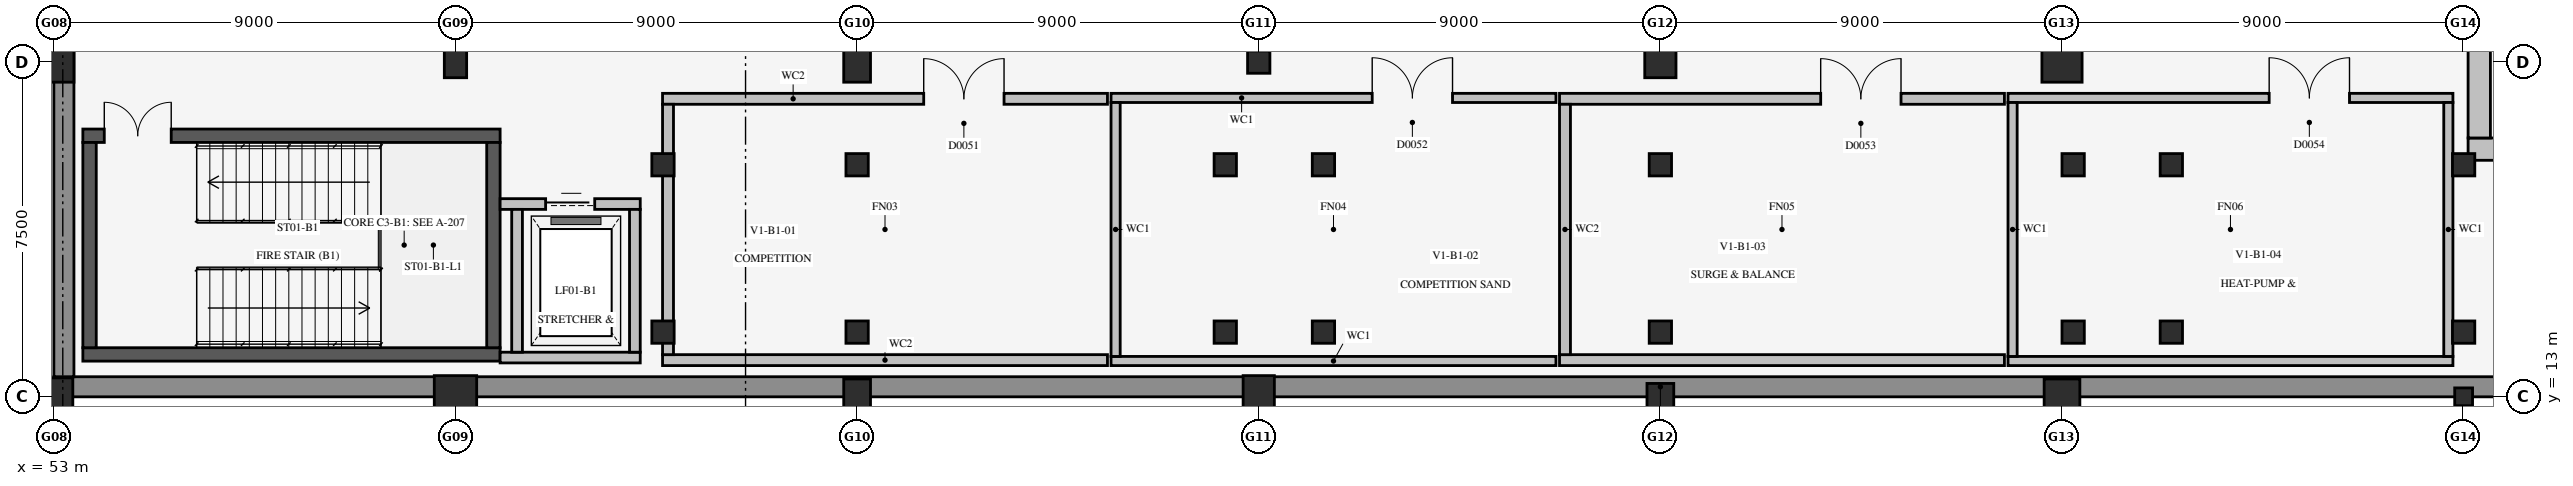
"""IFC4 building model, lengths in metres.
Left out: names, types, materials, properties, quantities, classifications, styles, units other than length and angle.
Written with IfcOpenShell. Run it as: python <this file> out.ifc"""

import sys

from ifc_helpers import new_model, si_unit, direction, frame, frame_2d, origin, origin_2d, place, context, subcontext, project, spatial, rectangle, circle, extrude, element, fill, save


model = new_model("IFC4")
c1 = context("Model", 3, precision=1e-05, world=origin(), true_north=direction((0.0, 1.0)))
c2 = subcontext(c1, "Body", "Model", "MODEL_VIEW")
j1 = project(units=[si_unit("LENGTHUNIT", "METRE"), si_unit("PLANEANGLEUNIT", "RADIAN")], contexts=[c1])
p1 = place(None, origin())
s1 = spatial("IfcSite", under=j1, at=p1, CompositionType="ELEMENT")
p2 = place(p1, origin())
s2 = spatial("IfcBuilding", under=s1, at=p2, CompositionType="ELEMENT")
p3 = place(p2, frame((0.0, 0.0, -5.2)))
s3 = spatial("IfcBuildingStorey", under=s2, at=p3, CompositionType="ELEMENT", Elevation=-5.2)
p4 = place(p3, frame((107.1, 18.55, 0.0), z_axis=(0.0, 0.0, 1.0), x_axis=(1.0, 0.0, 0.0)))
e1 = element("IfcWall", 1, at=p4, inside=s3, PredefinedType="USERDEFINED", context=c2, shape_type="SweptSolid", body=[
    extrude(rectangle(XDim=17.45, YDim=0.5, at=frame_2d((8.725, 0.0))), origin(), (0.0, 0.0, 1.0), 4.92),
])
p5 = place(p3, frame((107.35, 18.8, 0.0), z_axis=(0.0, 0.0, 1.0), x_axis=(0.0, 1.0, 0.0)))
e2 = element("IfcWall", 2, at=p5, inside=s3, PredefinedType="USERDEFINED", context=c2, shape_type="SweptSolid", body=[
    extrude(rectangle(XDim=19.8, YDim=0.5, at=frame_2d((9.9, 0.0))), origin(), (0.0, 0.0, 1.0), 4.92),
])
p6 = place(p3, frame((53.0, 13.225, 0.0), z_axis=(0.0, 0.0, 1.0), x_axis=(1.0, 0.0, 0.0)))
e3 = element("IfcWall", 3, at=p6, inside=s3, PredefinedType="USERDEFINED", context=c2, shape_type="SweptSolid", body=[
    extrude(rectangle(XDim=72.0, YDim=0.45, at=frame_2d((36.0, 0.0))), origin(), (0.0, 0.0, 1.0), 4.92),
])
p7 = place(p3, frame((53.225, 13.45, 0.0), z_axis=(0.0, 0.0, 1.0), x_axis=(0.0, 1.0, 0.0)))
e4 = element("IfcWall", 4, at=p7, inside=s3, PredefinedType="USERDEFINED", context=c2, shape_type="SweptSolid", body=[
    extrude(rectangle(XDim=45.1, YDim=0.45, at=frame_2d((22.55, 0.0))), origin(), (0.0, 0.0, 1.0), 4.92),
])
p8 = place(p3, frame((53.65, 13.95, 0.0), z_axis=(0.0, 0.0, 1.0), x_axis=(1.0, 0.0, 0.0)))
e5 = element("IfcWall", 5, at=p8, inside=s3, PredefinedType="SHEAR", context=c2, shape_type="SweptSolid", body=[
    extrude(rectangle(XDim=9.35, YDim=0.3, at=frame_2d((4.675, 0.0))), origin(), (0.0, 0.0, 1.0), 4.92),
])
p9 = place(p3, frame((53.65, 18.85, 0.0), z_axis=(0.0, 0.0, 1.0), x_axis=(1.0, 0.0, 0.0)))
e6 = element("IfcWall", 6, at=p9, inside=s3, PredefinedType="SHEAR", context=c2, shape_type="SweptSolid", body=[
    extrude(rectangle(XDim=9.35, YDim=0.3, at=frame_2d((4.675, 0.0))), origin(), (0.0, 0.0, 1.0), 4.92),
])
p10 = place(p9, frame((0.48, 0.0, 0.0)))
e7 = element("IfcOpeningElement", 7, at=p10, cuts=e6, PredefinedType="OPENING", context=c2, shape_type="SweptSolid", body=[
    extrude(rectangle(XDim=1.5, YDim=2.3, at=frame_2d((0.75, 1.15))), frame((0.0, 0.162, 0.0), z_axis=(0.0, -1.0, 0.0), x_axis=(1.0, 0.0, 0.0)), (0.0, 0.0, 1.0), 0.324),
])
for number, where, z_axis, x_axis in (
    (8, (53.8, 14.1, 0.0), (0.0, 0.0, 1.0), (0.0, 1.0, 0.0)),
    (9, (62.85, 14.1, 0.0), (0.0, 0.0, 1.0), (0.0, 1.0, 0.0)),
):
    element("IfcWall", number, at=place(p3, frame(where, z_axis=z_axis, x_axis=x_axis)), inside=s3, PredefinedType="SHEAR", context=c2, shape_type="SweptSolid", body=[
        extrude(rectangle(XDim=4.6, YDim=0.3, at=frame_2d((2.3, 0.0))), origin(), (0.0, 0.0, 1.0), 4.92),
    ])
p11 = place(p3, frame((63.0, 13.88, 0.0), z_axis=(0.0, 0.0, 1.0), x_axis=(1.0, 0.0, 0.0)))
e10 = element("IfcWall", 10, at=p11, inside=s3, PredefinedType="SOLIDWALL", context=c2, shape_type="SweptSolid", body=[
    extrude(rectangle(XDim=3.14, YDim=0.24, at=frame_2d((1.57, 0.0))), origin(), (0.0, 0.0, 1.0), 5.2),
])
p12 = place(p3, frame((63.0, 17.32, 0.0), z_axis=(0.0, 0.0, 1.0), x_axis=(1.0, 0.0, 0.0)))
e11 = element("IfcWall", 11, at=p12, inside=s3, PredefinedType="SOLIDWALL", context=c2, shape_type="SweptSolid", body=[
    extrude(rectangle(XDim=3.14, YDim=0.24, at=frame_2d((1.57, 0.0))), origin(), (0.0, 0.0, 1.0), 5.2),
])
p13 = place(p12, frame((1.02, 0.0, 0.0)))
e12 = element("IfcOpeningElement", 12, at=p13, cuts=e11, PredefinedType="OPENING", context=c2, shape_type="SweptSolid", body=[
    extrude(rectangle(XDim=1.1, YDim=2.15, at=frame_2d((0.55, 1.075))), frame((0.0, 0.132, 0.0), z_axis=(0.0, -1.0, 0.0), x_axis=(1.0, 0.0, 0.0)), (0.0, 0.0, 1.0), 0.264),
])
for number, where, z_axis, x_axis in (
    (13, (63.38, 14.0, 0.0), (0.0, 0.0, 1.0), (0.0, 1.0, 0.0)),
    (14, (66.02, 14.0, 0.0), (0.0, 0.0, 1.0), (0.0, 1.0, 0.0)),
):
    element("IfcWall", number, at=place(p3, frame(where, z_axis=z_axis, x_axis=x_axis)), inside=s3, PredefinedType="SOLIDWALL", context=c2, shape_type="SweptSolid", body=[
        extrude(rectangle(XDim=3.2, YDim=0.24, at=frame_2d((1.6, 0.0))), origin(), (0.0, 0.0, 1.0), 5.2),
    ])
p14 = place(p3, frame((53.0, 13.0, 0.0), z_axis=(0.0, 0.0, 1.0), x_axis=(1.0, 0.0, 0.0)))
e15 = element("IfcColumn", 15, at=p14, inside=s3, PredefinedType="COLUMN", context=c2, shape_type="SweptSolid", body=[
    extrude(rectangle(XDim=0.85, YDim=0.85, at=origin_2d()), origin(), (0.0, 0.0, 1.0), 5.2),
])
p15 = place(p3, frame((53.0, 20.5, 0.0), z_axis=(0.0, 0.0, 1.0), x_axis=(1.0, 0.0, 0.0)))
e16 = element("IfcColumn", 16, at=p15, inside=s3, PredefinedType="COLUMN", context=c2, shape_type="SweptSolid", body=[
    extrude(rectangle(XDim=0.9, YDim=0.9, at=origin_2d()), origin(), (0.0, 0.0, 1.0), 5.2),
])
p16 = place(p3, frame((62.0, 13.0, 0.0), z_axis=(0.0, 0.0, 1.0), x_axis=(1.0, 0.0, 0.0)))
e17 = element("IfcColumn", 17, at=p16, inside=s3, PredefinedType="COLUMN", context=c2, shape_type="SweptSolid", body=[
    extrude(rectangle(XDim=0.95, YDim=0.95, at=origin_2d()), origin(), (0.0, 0.0, 1.0), 5.2),
])
p17 = place(p3, frame((62.0, 20.5, 0.0), z_axis=(0.0, 0.0, 1.0), x_axis=(1.0, 0.0, 0.0)))
e18 = element("IfcColumn", 18, at=p17, inside=s3, PredefinedType="COLUMN", context=c2, shape_type="SweptSolid", body=[
    extrude(rectangle(XDim=0.5, YDim=0.7, at=origin_2d()), origin(), (0.0, 0.0, 1.0), 4.9),
])
p18 = place(p3, frame((71.0, 13.0, 0.0), z_axis=(0.0, 0.0, 1.0), x_axis=(1.0, 0.0, 0.0)))
e19 = element("IfcColumn", 19, at=p18, inside=s3, PredefinedType="COLUMN", context=c2, shape_type="SweptSolid", body=[
    extrude(rectangle(XDim=0.6, YDim=0.8, at=origin_2d()), origin(), (0.0, 0.0, 1.0), 5.2),
])
p19 = place(p3, frame((71.0, 20.5, 0.0), z_axis=(0.0, 0.0, 1.0), x_axis=(1.0, 0.0, 0.0)))
e20 = element("IfcColumn", 20, at=p19, inside=s3, PredefinedType="COLUMN", context=c2, shape_type="SweptSolid", body=[
    extrude(rectangle(XDim=0.6, YDim=0.9, at=origin_2d()), origin(), (0.0, 0.0, 1.0), 4.9),
])
p20 = place(p3, frame((80.0, 13.0, 0.0), z_axis=(0.0, 0.0, 1.0), x_axis=(1.0, 0.0, 0.0)))
e21 = element("IfcColumn", 21, at=p20, inside=s3, PredefinedType="COLUMN", context=c2, shape_type="SweptSolid", body=[
    extrude(rectangle(XDim=0.7, YDim=0.95, at=origin_2d()), origin(), (0.0, 0.0, 1.0), 5.2),
])
p21 = place(p3, frame((80.0, 20.5, 0.0), z_axis=(0.0, 0.0, 1.0), x_axis=(1.0, 0.0, 0.0)))
e22 = element("IfcColumn", 22, at=p21, inside=s3, PredefinedType="COLUMN", context=c2, shape_type="SweptSolid", body=[
    extrude(circle(Radius=0.25, at=origin_2d()), origin(), (0.0, 0.0, 1.0), 4.9),
])
p22 = place(p3, frame((89.0, 13.0, 0.0), z_axis=(0.0, 0.0, 1.0), x_axis=(1.0, 0.0, 0.0)))
e23 = element("IfcColumn", 23, at=p22, inside=s3, PredefinedType="COLUMN", context=c2, shape_type="SweptSolid", body=[
    extrude(circle(Radius=0.3, at=origin_2d()), origin(), (0.0, 0.0, 1.0), 5.2),
])
p23 = place(p3, frame((89.0, 20.5, 0.0), z_axis=(0.0, 0.0, 1.0), x_axis=(1.0, 0.0, 0.0)))
e24 = element("IfcColumn", 24, at=p23, inside=s3, PredefinedType="COLUMN", context=c2, shape_type="SweptSolid", body=[
    extrude(circle(Radius=0.35, at=origin_2d()), origin(), (0.0, 0.0, 1.0), 4.9),
])
p24 = place(p3, frame((98.0, 13.0, 0.0), z_axis=(0.0, 0.0, 1.0), x_axis=(1.0, 0.0, 0.0)))
e25 = element("IfcColumn", 25, at=p24, inside=s3, PredefinedType="COLUMN", context=c2, shape_type="SweptSolid", body=[
    extrude(circle(Radius=0.4, at=origin_2d()), origin(), (0.0, 0.0, 1.0), 5.2),
])
p25 = place(p3, frame((98.0, 20.5, 0.0), z_axis=(0.0, 0.0, 1.0), x_axis=(1.0, 0.0, 0.0)))
e26 = element("IfcColumn", 26, at=p25, inside=s3, PredefinedType="COLUMN", context=c2, shape_type="SweptSolid", body=[
    extrude(circle(Radius=0.45, at=origin_2d()), origin(), (0.0, 0.0, 1.0), 4.9),
])
p26 = place(p3, frame((107.0, 13.0, 0.0), z_axis=(0.0, 0.0, 1.0), x_axis=(1.0, 0.0, 0.0)))
e27 = element("IfcColumn", 27, at=p26, inside=s3, PredefinedType="COLUMN", context=c2, shape_type="SweptSolid", body=[
    extrude(rectangle(XDim=0.4, YDim=0.4, at=origin_2d()), origin(), (0.0, 0.0, 1.0), 5.2),
])
for number, where, z_axis, x_axis in (
    (28, (66.65, 18.2, 0.0), (0.0, 0.0, 1.0), (1.0, 0.0, 0.0)),
    (29, (66.65, 14.45, 0.0), (0.0, 0.0, 1.0), (1.0, 0.0, 0.0)),
    (30, (71.0, 18.2, 0.0), (0.0, 0.0, 1.0), (1.0, 0.0, 0.0)),
    (31, (71.0, 14.45, 0.0), (0.0, 0.0, 1.0), (1.0, 0.0, 0.0)),
    (32, (79.25, 18.2, 0.0), (0.0, 0.0, 1.0), (1.0, 0.0, 0.0)),
    (33, (79.25, 14.45, 0.0), (0.0, 0.0, 1.0), (1.0, 0.0, 0.0)),
    (34, (81.45, 18.2, 0.0), (0.0, 0.0, 1.0), (1.0, 0.0, 0.0)),
    (35, (81.45, 14.45, 0.0), (0.0, 0.0, 1.0), (1.0, 0.0, 0.0)),
    (36, (89.0, 18.2, 0.0), (0.0, 0.0, 1.0), (1.0, 0.0, 0.0)),
    (37, (89.0, 14.45, 0.0), (0.0, 0.0, 1.0), (1.0, 0.0, 0.0)),
    (38, (98.25, 18.2, 0.0), (0.0, 0.0, 1.0), (1.0, 0.0, 0.0)),
    (39, (98.25, 14.45, 0.0), (0.0, 0.0, 1.0), (1.0, 0.0, 0.0)),
    (40, (100.45, 18.2, 0.0), (0.0, 0.0, 1.0), (1.0, 0.0, 0.0)),
    (41, (100.45, 14.45, 0.0), (0.0, 0.0, 1.0), (1.0, 0.0, 0.0)),
    (42, (107.0, 18.2, 0.0), (0.0, 0.0, 1.0), (1.0, 0.0, 0.0)),
    (43, (107.0, 14.45, 0.0), (0.0, 0.0, 1.0), (1.0, 0.0, 0.0)),
):
    element("IfcColumn", number, at=place(p3, frame(where, z_axis=z_axis, x_axis=x_axis)), inside=s3, PredefinedType="COLUMN", context=c2, shape_type="SweptSolid", body=[
        extrude(rectangle(XDim=0.5, YDim=0.5, at=origin_2d()), origin(), (0.0, 0.0, 1.0), 4.92),
    ])
p27 = place(p3, frame((66.64, 13.823, 0.0), z_axis=(0.0, 0.0, 1.0), x_axis=(1.0, 0.0, 0.0)))
e44 = element("IfcWall", 44, at=p27, inside=s3, PredefinedType="SOLIDWALL", context=c2, shape_type="SweptSolid", body=[
    extrude(rectangle(XDim=9.97, YDim=0.245, at=frame_2d((4.985, 0.0))), origin(), (0.0, 0.0, 1.0), 4.905),
])
p28 = place(p3, frame((66.64, 19.677, 0.0), z_axis=(0.0, 0.0, 1.0), x_axis=(1.0, 0.0, 0.0)))
e45 = element("IfcWall", 45, at=p28, inside=s3, PredefinedType="SOLIDWALL", context=c2, shape_type="SweptSolid", body=[
    extrude(rectangle(XDim=9.97, YDim=0.245, at=frame_2d((4.985, 0.0))), origin(), (0.0, 0.0, 1.0), 4.905),
])
p29 = place(p28, frame((5.853, 0.0, 0.0)))
e46 = element("IfcOpeningElement", 46, at=p29, cuts=e45, PredefinedType="OPENING", context=c2, shape_type="SweptSolid", body=[
    extrude(rectangle(XDim=1.8, YDim=2.35, at=frame_2d((0.9, 1.175))), frame((0.0, 0.135, 0.0), z_axis=(0.0, -1.0, 0.0), x_axis=(1.0, 0.0, 0.0)), (0.0, 0.0, 1.0), 0.269),
])
p30 = place(p3, frame((66.762, 13.945, 0.0), z_axis=(0.0, 0.0, 1.0), x_axis=(0.0, 1.0, 0.0)))
e47 = element("IfcWall", 47, at=p30, inside=s3, PredefinedType="SOLIDWALL", context=c2, shape_type="SweptSolid", body=[
    extrude(rectangle(XDim=5.61, YDim=0.245, at=frame_2d((2.805, 0.0))), origin(), (0.0, 0.0, 1.0), 4.905),
])
p31 = place(p3, frame((76.69, 13.802, 0.0), z_axis=(0.0, 0.0, 1.0), x_axis=(1.0, 0.0, 0.0)))
e48 = element("IfcWall", 48, at=p31, inside=s3, PredefinedType="SOLIDWALL", context=c2, shape_type="SweptSolid", body=[
    extrude(rectangle(XDim=9.97, YDim=0.205, at=frame_2d((4.985, 0.0))), origin(), (0.0, 0.0, 1.0), 4.905),
])
p32 = place(p3, frame((76.69, 19.698, 0.0), z_axis=(0.0, 0.0, 1.0), x_axis=(1.0, 0.0, 0.0)))
e49 = element("IfcWall", 49, at=p32, inside=s3, PredefinedType="SOLIDWALL", context=c2, shape_type="SweptSolid", body=[
    extrude(rectangle(XDim=9.97, YDim=0.205, at=frame_2d((4.985, 0.0))), origin(), (0.0, 0.0, 1.0), 4.905),
])
p33 = place(p32, frame((5.853, 0.0, 0.0)))
e50 = element("IfcOpeningElement", 50, at=p33, cuts=e49, PredefinedType="OPENING", context=c2, shape_type="SweptSolid", body=[
    extrude(rectangle(XDim=1.8, YDim=2.35, at=frame_2d((0.9, 1.175))), frame((0.0, 0.115, 0.0), z_axis=(0.0, -1.0, 0.0), x_axis=(1.0, 0.0, 0.0)), (0.0, 0.0, 1.0), 0.229),
])
p34 = place(p3, frame((76.792, 13.905, 0.0), z_axis=(0.0, 0.0, 1.0), x_axis=(0.0, 1.0, 0.0)))
e51 = element("IfcWall", 51, at=p34, inside=s3, PredefinedType="SOLIDWALL", context=c2, shape_type="SweptSolid", body=[
    extrude(rectangle(XDim=5.69, YDim=0.205, at=frame_2d((2.845, 0.0))), origin(), (0.0, 0.0, 1.0), 4.32),
])
p35 = place(p3, frame((86.74, 13.823, 0.0), z_axis=(0.0, 0.0, 1.0), x_axis=(1.0, 0.0, 0.0)))
e52 = element("IfcWall", 52, at=p35, inside=s3, PredefinedType="SOLIDWALL", context=c2, shape_type="SweptSolid", body=[
    extrude(rectangle(XDim=9.97, YDim=0.245, at=frame_2d((4.985, 0.0))), origin(), (0.0, 0.0, 1.0), 4.905),
])
p36 = place(p3, frame((86.74, 19.677, 0.0), z_axis=(0.0, 0.0, 1.0), x_axis=(1.0, 0.0, 0.0)))
e53 = element("IfcWall", 53, at=p36, inside=s3, PredefinedType="SOLIDWALL", context=c2, shape_type="SweptSolid", body=[
    extrude(rectangle(XDim=9.97, YDim=0.245, at=frame_2d((4.985, 0.0))), origin(), (0.0, 0.0, 1.0), 4.905),
])
p37 = place(p36, frame((5.853, 0.0, 0.0)))
e54 = element("IfcOpeningElement", 54, at=p37, cuts=e53, PredefinedType="OPENING", context=c2, shape_type="SweptSolid", body=[
    extrude(rectangle(XDim=1.8, YDim=2.35, at=frame_2d((0.9, 1.175))), frame((0.0, 0.135, 0.0), z_axis=(0.0, -1.0, 0.0), x_axis=(1.0, 0.0, 0.0)), (0.0, 0.0, 1.0), 0.269),
])
p38 = place(p3, frame((86.863, 13.945, 0.0), z_axis=(0.0, 0.0, 1.0), x_axis=(0.0, 1.0, 0.0)))
e55 = element("IfcWall", 55, at=p38, inside=s3, PredefinedType="SOLIDWALL", context=c2, shape_type="SweptSolid", body=[
    extrude(rectangle(XDim=5.61, YDim=0.245, at=frame_2d((2.805, 0.0))), origin(), (0.0, 0.0, 1.0), 4.905),
])
p39 = place(p3, frame((96.79, 13.802, 0.0), z_axis=(0.0, 0.0, 1.0), x_axis=(1.0, 0.0, 0.0)))
e56 = element("IfcWall", 56, at=p39, inside=s3, PredefinedType="SOLIDWALL", context=c2, shape_type="SweptSolid", body=[
    extrude(rectangle(XDim=9.97, YDim=0.205, at=frame_2d((4.985, 0.0))), origin(), (0.0, 0.0, 1.0), 4.905),
])
p40 = place(p3, frame((96.79, 19.698, 0.0), z_axis=(0.0, 0.0, 1.0), x_axis=(1.0, 0.0, 0.0)))
e57 = element("IfcWall", 57, at=p40, inside=s3, PredefinedType="SOLIDWALL", context=c2, shape_type="SweptSolid", body=[
    extrude(rectangle(XDim=9.97, YDim=0.205, at=frame_2d((4.985, 0.0))), origin(), (0.0, 0.0, 1.0), 4.905),
])
p41 = place(p40, frame((5.853, 0.0, 0.0)))
e58 = element("IfcOpeningElement", 58, at=p41, cuts=e57, PredefinedType="OPENING", context=c2, shape_type="SweptSolid", body=[
    extrude(rectangle(XDim=1.8, YDim=2.35, at=frame_2d((0.9, 1.175))), frame((0.0, 0.115, 0.0), z_axis=(0.0, -1.0, 0.0), x_axis=(1.0, 0.0, 0.0)), (0.0, 0.0, 1.0), 0.229),
])
for number, where, z_axis, x_axis in (
    (59, (106.657, 13.905, 0.0), (0.0, 0.0, 1.0), (0.0, 1.0, 0.0)),
    (60, (96.893, 13.905, 0.0), (0.0, 0.0, 1.0), (0.0, 1.0, 0.0)),
):
    element("IfcWall", number, at=place(p3, frame(where, z_axis=z_axis, x_axis=x_axis)), inside=s3, PredefinedType="SOLIDWALL", context=c2, shape_type="SweptSolid", body=[
        extrude(rectangle(XDim=5.69, YDim=0.205, at=frame_2d((2.845, 0.0))), origin(), (0.0, 0.0, 1.0), 4.905),
    ])
p42 = place(p10, frame((1.5, 0.0, 0.0), z_axis=(0.0, 0.0, 1.0), x_axis=(-1.0, 0.0, 0.0)))
e61 = element("IfcDoor", 61, at=p42, inside=s3, OperationType="DOUBLE_DOOR_SINGLE_SWING", PredefinedType="DOOR", context=c2, shape_type="SweptSolid", body=[
    extrude(rectangle(XDim=1.5, YDim=2.3, at=frame_2d((0.75, 1.15))), frame((0.0, 0.025, 0.0), z_axis=(0.0, -1.0, 0.0), x_axis=(1.0, 0.0, 0.0)), (0.0, 0.0, 1.0), 0.05),
])
fill(e7, e61)
p43 = place(p29, frame((1.8, 0.0, 0.0), z_axis=(0.0, 0.0, 1.0), x_axis=(-1.0, 0.0, 0.0)))
e62 = element("IfcDoor", 62, at=p43, inside=s3, OperationType="DOUBLE_DOOR_SINGLE_SWING", PredefinedType="DOOR", context=c2, shape_type="SweptSolid", body=[
    extrude(rectangle(XDim=1.8, YDim=2.35, at=frame_2d((0.9, 1.175))), frame((0.0, 0.025, 0.0), z_axis=(0.0, -1.0, 0.0), x_axis=(1.0, 0.0, 0.0)), (0.0, 0.0, 1.0), 0.05),
])
fill(e46, e62)
p44 = place(p33, frame((1.8, 0.0, 0.0), z_axis=(0.0, 0.0, 1.0), x_axis=(-1.0, 0.0, 0.0)))
e63 = element("IfcDoor", 63, at=p44, inside=s3, OperationType="DOUBLE_DOOR_SINGLE_SWING", PredefinedType="DOOR", context=c2, shape_type="SweptSolid", body=[
    extrude(rectangle(XDim=1.8, YDim=2.35, at=frame_2d((0.9, 1.175))), frame((0.0, 0.025, 0.0), z_axis=(0.0, -1.0, 0.0), x_axis=(1.0, 0.0, 0.0)), (0.0, 0.0, 1.0), 0.05),
])
fill(e50, e63)
p45 = place(p37, frame((1.8, 0.0, 0.0), z_axis=(0.0, 0.0, 1.0), x_axis=(-1.0, 0.0, 0.0)))
e64 = element("IfcDoor", 64, at=p45, inside=s3, OperationType="DOUBLE_DOOR_SINGLE_SWING", PredefinedType="DOOR", context=c2, shape_type="SweptSolid", body=[
    extrude(rectangle(XDim=1.8, YDim=2.35, at=frame_2d((0.9, 1.175))), frame((0.0, 0.025, 0.0), z_axis=(0.0, -1.0, 0.0), x_axis=(1.0, 0.0, 0.0)), (0.0, 0.0, 1.0), 0.05),
])
fill(e54, e64)
p46 = place(p41, frame((1.8, 0.0, 0.0), z_axis=(0.0, 0.0, 1.0), x_axis=(-1.0, 0.0, 0.0)))
e65 = element("IfcDoor", 65, at=p46, inside=s3, OperationType="DOUBLE_DOOR_SINGLE_SWING", PredefinedType="DOOR", context=c2, shape_type="SweptSolid", body=[
    extrude(rectangle(XDim=1.8, YDim=2.35, at=frame_2d((0.9, 1.175))), frame((0.0, 0.025, 0.0), z_axis=(0.0, -1.0, 0.0), x_axis=(1.0, 0.0, 0.0)), (0.0, 0.0, 1.0), 0.05),
])
fill(e58, e65)
p47 = place(p13, origin())
e66 = element("IfcDoor", 66, at=p47, inside=s3, OperationType="SLIDING_TO_LEFT", PredefinedType="USERDEFINED", context=c2, shape_type="SweptSolid", body=[
    extrude(rectangle(XDim=1.1, YDim=2.15, at=frame_2d((0.55, 1.075))), frame((0.0, 0.025, 0.0), z_axis=(0.0, -1.0, 0.0), x_axis=(1.0, 0.0, 0.0)), (0.0, 0.0, 1.0), 0.05),
])
fill(e12, e66)
save(model, sys.argv[1])
